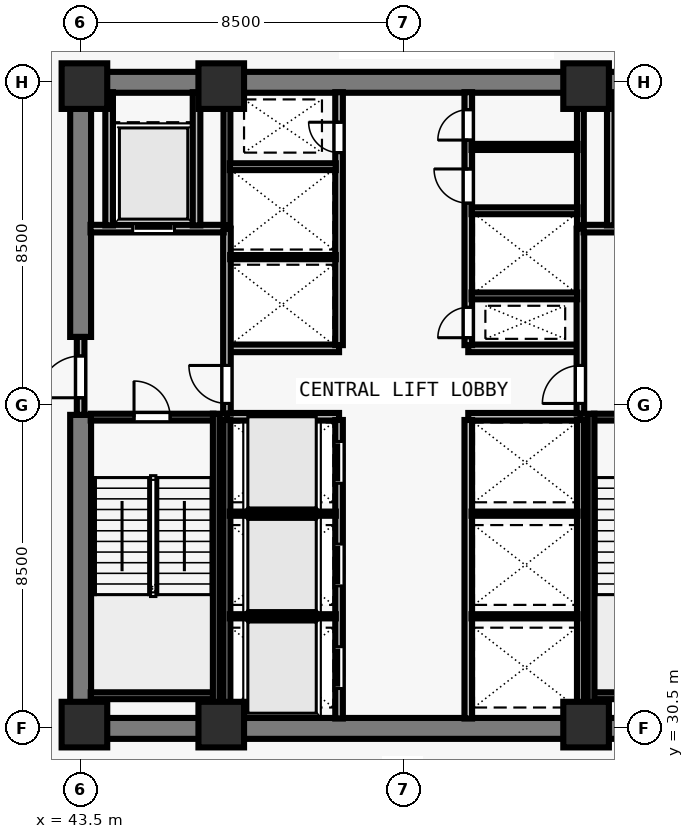
"""IFC4 building model, lengths in metres.
Left out: names, types, materials, properties, quantities, classifications, styles, units other than length and angle.
Written with IfcOpenShell. Run it as: python <this file> out.ifc"""

import sys

from ifc_helpers import new_model, si_unit, direction, frame, frame_2d, origin, origin_2d, place, context, subcontext, project, spatial, rectangle, extrude, element, fill, save


model = new_model("IFC4")
c1 = context("Model", 3, precision=1e-05, world=origin(), true_north=direction((0.0, 1.0)))
c2 = subcontext(c1, "Body", "Model", "MODEL_VIEW")
j1 = project(units=[si_unit("LENGTHUNIT", "METRE"), si_unit("PLANEANGLEUNIT", "RADIAN")], contexts=[c1])
p1 = place(None, origin())
s1 = spatial("IfcSite", under=j1, at=p1, CompositionType="ELEMENT")
p2 = place(p1, origin())
s2 = spatial("IfcBuilding", under=s1, at=p2, CompositionType="ELEMENT")
p3 = place(p2, frame((0.0, 0.0, 97.0)))
s3 = spatial("IfcBuildingStorey", under=s2, at=p3, CompositionType="ELEMENT", Elevation=97.0)
for number, where, z_axis, x_axis in (
    (1, (43.6, 30.6, 0.0), (0.0, 0.0, 1.0), (1.0, 0.0, 0.0)),
    (2, (47.2, 30.6, 0.0), (0.0, 0.0, 1.0), (1.0, 0.0, 0.0)),
    (3, (56.8, 30.6, 0.0), (0.0, 0.0, 1.0), (1.0, 0.0, 0.0)),
    (4, (43.6, 47.4, 0.0), (0.0, 0.0, 1.0), (1.0, 0.0, 0.0)),
    (5, (47.2, 47.4, 0.0), (0.0, 0.0, 1.0), (1.0, 0.0, 0.0)),
    (6, (56.8, 47.4, 0.0), (0.0, 0.0, 1.0), (1.0, 0.0, 0.0)),
):
    element("IfcColumn", number, at=place(p3, frame(where, z_axis=z_axis, x_axis=x_axis)), inside=s3, PredefinedType="COLUMN", context=c2, shape_type="SweptSolid", body=[
        extrude(rectangle(XDim=1.2, YDim=1.2, at=origin_2d()), origin(), (0.0, 0.0, 1.0), 4.5),
    ])
for number, where, z_axis, x_axis in (
    (7, (43.225, 30.5, 0.0), (0.0, 0.0, 1.0), (1.0, 0.0, 0.0)),
    (8, (43.225, 47.5, 0.0), (0.0, 0.0, 1.0), (1.0, 0.0, 0.0)),
):
    element("IfcWall", number, at=place(p3, frame(where, z_axis=z_axis, x_axis=x_axis)), inside=s3, PredefinedType="SHEAR", context=c2, shape_type="SweptSolid", body=[
        extrude(rectangle(XDim=17.55, YDim=0.55, at=frame_2d((8.775, 0.0))), origin(), (0.0, 0.0, 1.0), 4.28),
    ])
p4 = place(p3, frame((43.5, 30.765, 0.0), z_axis=(0.0, 0.0, 1.0), x_axis=(0.0, 1.0, 0.0)))
e9 = element("IfcWall", 9, at=p4, inside=s3, PredefinedType="SHEAR", context=c2, shape_type="SweptSolid", body=[
    extrude(rectangle(XDim=7.985, YDim=0.55, at=frame_2d((3.993, 0.0))), origin(), (0.0, 0.0, 1.0), 4.28),
])
p5 = place(p3, frame((43.5, 40.8, 0.0), z_axis=(0.0, 0.0, 1.0), x_axis=(0.0, 1.0, 0.0)))
e10 = element("IfcWall", 10, at=p5, inside=s3, PredefinedType="SHEAR", context=c2, shape_type="SweptSolid", body=[
    extrude(rectangle(XDim=6.435, YDim=0.55, at=frame_2d((3.218, 0.0))), origin(), (0.0, 0.0, 1.0), 4.28),
])
for number, where, z_axis, x_axis in (
    (11, (47.35, 38.7, 0.0), (0.0, 0.0, 1.0), (1.0, 0.0, 0.0)),
    (12, (47.35, 40.5, 0.0), (0.0, 0.0, 1.0), (1.0, 0.0, 0.0)),
    (13, (53.7, 38.7, 0.0), (0.0, 0.0, 1.0), (1.0, 0.0, 0.0)),
    (14, (53.7, 40.5, 0.0), (0.0, 0.0, 1.0), (1.0, 0.0, 0.0)),
):
    element("IfcWall", number, at=place(p3, frame(where, z_axis=z_axis, x_axis=x_axis)), inside=s3, PredefinedType="SOLIDWALL", context=c2, shape_type="SweptSolid", body=[
        extrude(rectangle(XDim=2.95, YDim=0.2, at=frame_2d((1.475, 0.0))), origin(), (0.0, 0.0, 1.0), 4.28),
    ])
p6 = place(p3, frame((50.3, 30.76, 0.0), z_axis=(0.0, 0.0, 1.0), x_axis=(0.0, 1.0, 0.0)))
e15 = element("IfcWall", 15, at=p6, inside=s3, PredefinedType="SOLIDWALL", context=c2, shape_type="SweptSolid", body=[
    extrude(rectangle(XDim=7.855, YDim=0.2, at=frame_2d((3.927, 0.0))), origin(), (0.0, 0.0, 1.0), 4.28),
])
p7 = place(p6, frame((0.79, 0.0, 0.0)))
e16 = element("IfcOpeningElement", 16, at=p7, cuts=e15, PredefinedType="OPENING", context=c2, shape_type="SweptSolid", body=[
    extrude(rectangle(XDim=1.1, YDim=2.2, at=frame_2d((0.55, 1.1))), frame((0.0, 0.11, 0.0), z_axis=(0.0, -1.0, 0.0), x_axis=(1.0, 0.0, 0.0)), (0.0, 0.0, 1.0), 0.22),
])
p8 = place(p6, frame((3.49, 0.0, 0.0)))
e17 = element("IfcOpeningElement", 17, at=p8, cuts=e15, PredefinedType="OPENING", context=c2, shape_type="SweptSolid", body=[
    extrude(rectangle(XDim=1.1, YDim=2.2, at=frame_2d((0.55, 1.1))), frame((0.0, 0.11, 0.0), z_axis=(0.0, -1.0, 0.0), x_axis=(1.0, 0.0, 0.0)), (0.0, 0.0, 1.0), 0.22),
])
p9 = place(p6, frame((6.19, 0.0, 0.0)))
e18 = element("IfcOpeningElement", 18, at=p9, cuts=e15, PredefinedType="OPENING", context=c2, shape_type="SweptSolid", body=[
    extrude(rectangle(XDim=1.1, YDim=2.2, at=frame_2d((0.55, 1.1))), frame((0.0, 0.11, 0.0), z_axis=(0.0, -1.0, 0.0), x_axis=(1.0, 0.0, 0.0)), (0.0, 0.0, 1.0), 0.22),
])
p10 = place(p3, frame((53.7, 30.76, 0.0), z_axis=(0.0, 0.0, 1.0), x_axis=(0.0, 1.0, 0.0)))
e19 = element("IfcWall", 19, at=p10, inside=s3, PredefinedType="SOLIDWALL", context=c2, shape_type="SweptSolid", body=[
    extrude(rectangle(XDim=7.855, YDim=0.2, at=frame_2d((3.927, 0.0))), origin(), (0.0, 0.0, 1.0), 4.28),
])
p11 = place(p3, frame((50.3, 40.585, 0.0), z_axis=(0.0, 0.0, 1.0), x_axis=(0.0, 1.0, 0.0)))
e20 = element("IfcWall", 20, at=p11, inside=s3, PredefinedType="SOLIDWALL", context=c2, shape_type="SweptSolid", body=[
    extrude(rectangle(XDim=6.655, YDim=0.2, at=frame_2d((3.328, 0.0))), origin(), (0.0, 0.0, 1.0), 4.28),
])
p12 = place(p11, frame((5.065, 0.0, 0.0)))
e21 = element("IfcOpeningElement", 21, at=p12, cuts=e20, PredefinedType="OPENING", context=c2, shape_type="SweptSolid", body=[
    extrude(rectangle(XDim=0.8, YDim=2.08, at=frame_2d((0.4, 1.04))), frame((0.0, 0.11, 0.0), z_axis=(0.0, -1.0, 0.0), x_axis=(1.0, 0.0, 0.0)), (0.0, 0.0, 1.0), 0.22),
])
p13 = place(p3, frame((53.7, 40.585, 0.0), z_axis=(0.0, 0.0, 1.0), x_axis=(0.0, 1.0, 0.0)))
e22 = element("IfcWall", 22, at=p13, inside=s3, PredefinedType="SOLIDWALL", context=c2, shape_type="SweptSolid", body=[
    extrude(rectangle(XDim=6.655, YDim=0.2, at=frame_2d((3.328, 0.0))), origin(), (0.0, 0.0, 1.0), 4.28),
])
p14 = place(p13, frame((0.195, 0.0, 0.0)))
e23 = element("IfcOpeningElement", 23, at=p14, cuts=e22, PredefinedType="OPENING", context=c2, shape_type="SweptSolid", body=[
    extrude(rectangle(XDim=0.8, YDim=2.08, at=frame_2d((0.4, 1.04))), frame((0.0, 0.11, 0.0), z_axis=(0.0, -1.0, 0.0), x_axis=(1.0, 0.0, 0.0)), (0.0, 0.0, 1.0), 0.22),
])
p15 = place(p13, frame((3.735, 0.0, 0.0)))
e24 = element("IfcOpeningElement", 24, at=p15, cuts=e22, PredefinedType="OPENING", context=c2, shape_type="SweptSolid", body=[
    extrude(rectangle(XDim=0.9, YDim=2.12, at=frame_2d((0.45, 1.06))), frame((0.0, 0.11, 0.0), z_axis=(0.0, -1.0, 0.0), x_axis=(1.0, 0.0, 0.0)), (0.0, 0.0, 1.0), 0.22),
])
p16 = place(p13, frame((5.395, 0.0, 0.0)))
e25 = element("IfcOpeningElement", 25, at=p16, cuts=e22, PredefinedType="OPENING", context=c2, shape_type="SweptSolid", body=[
    extrude(rectangle(XDim=0.8, YDim=2.1, at=frame_2d((0.4, 1.05))), frame((0.0, 0.11, 0.0), z_axis=(0.0, -1.0, 0.0), x_axis=(1.0, 0.0, 0.0)), (0.0, 0.0, 1.0), 0.22),
])
p17 = place(p3, frame((43.5, 38.75, 0.0), z_axis=(0.0, 0.0, 1.0), x_axis=(0.0, 1.0, 0.0)))
e26 = element("IfcWall", 26, at=p17, inside=s3, PredefinedType="SOLIDWALL", context=c2, shape_type="SweptSolid", body=[
    extrude(rectangle(XDim=2.05, YDim=0.2, at=frame_2d((1.025, 0.0))), origin(), (0.0, 0.0, 1.0), 4.28),
])
p18 = place(p17, frame((0.45, 0.0, 0.0)))
e27 = element("IfcOpeningElement", 27, at=p18, cuts=e26, PredefinedType="OPENING", context=c2, shape_type="SweptSolid", body=[
    extrude(rectangle(XDim=1.1, YDim=2.15, at=frame_2d((0.55, 1.075))), frame((0.0, 0.11, 0.0), z_axis=(0.0, -1.0, 0.0), x_axis=(1.0, 0.0, 0.0)), (0.0, 0.0, 1.0), 0.22),
])
p19 = place(p3, frame((47.35, 38.785, 0.0), z_axis=(0.0, 0.0, 1.0), x_axis=(0.0, 1.0, 0.0)))
e28 = element("IfcWall", 28, at=p19, inside=s3, PredefinedType="SOLIDWALL", context=c2, shape_type="SweptSolid", body=[
    extrude(rectangle(XDim=4.865, YDim=0.2, at=frame_2d((2.433, 0.0))), origin(), (0.0, 0.0, 1.0), 4.28),
])
p20 = place(p19, frame((0.265, 0.0, 0.0)))
e29 = element("IfcOpeningElement", 29, at=p20, cuts=e28, PredefinedType="OPENING", context=c2, shape_type="SweptSolid", body=[
    extrude(rectangle(XDim=1.0, YDim=2.15, at=frame_2d((0.5, 1.075))), frame((0.0, 0.11, 0.0), z_axis=(0.0, -1.0, 0.0), x_axis=(1.0, 0.0, 0.0)), (0.0, 0.0, 1.0), 0.22),
])
p21 = place(p3, frame((43.76, 43.65, 0.0), z_axis=(0.0, 0.0, 1.0), x_axis=(1.0, 0.0, 0.0)))
e30 = element("IfcWall", 30, at=p21, inside=s3, PredefinedType="SOLIDWALL", context=c2, shape_type="SweptSolid", body=[
    extrude(rectangle(XDim=3.505, YDim=0.2, at=frame_2d((1.752, 0.0))), origin(), (0.0, 0.0, 1.0), 4.28),
])
p22 = place(p21, frame((1.11, 0.0, 0.0)))
e31 = element("IfcOpeningElement", 31, at=p22, cuts=e30, PredefinedType="OPENING", context=c2, shape_type="SweptSolid", body=[
    extrude(rectangle(XDim=1.1, YDim=2.2, at=frame_2d((0.55, 1.1))), frame((0.0, 0.11, 0.0), z_axis=(0.0, -1.0, 0.0), x_axis=(1.0, 0.0, 0.0)), (0.0, 0.0, 1.0), 0.22),
])
for number, where, z_axis, x_axis in (
    (32, (46.55, 43.735, 0.0), (0.0, 0.0, 1.0), (0.0, 1.0, 0.0)),
    (33, (44.25, 43.735, 0.0), (0.0, 0.0, 1.0), (0.0, 1.0, 0.0)),
):
    element("IfcWall", number, at=place(p3, frame(where, z_axis=z_axis, x_axis=x_axis)), inside=s3, PredefinedType="SOLIDWALL", context=c2, shape_type="SweptSolid", body=[
        extrude(rectangle(XDim=3.505, YDim=0.2, at=frame_2d((1.752, 0.0))), origin(), (0.0, 0.0, 1.0), 4.28),
    ])
p23 = place(p3, frame((56.65, 38.785, 0.0), z_axis=(0.0, 0.0, 1.0), x_axis=(0.0, 1.0, 0.0)))
e34 = element("IfcWall", 34, at=p23, inside=s3, PredefinedType="SOLIDWALL", context=c2, shape_type="SweptSolid", body=[
    extrude(rectangle(XDim=4.865, YDim=0.2, at=frame_2d((2.433, 0.0))), origin(), (0.0, 0.0, 1.0), 4.28),
])
p24 = place(p23, frame((0.265, 0.0, 0.0)))
e35 = element("IfcOpeningElement", 35, at=p24, cuts=e34, PredefinedType="OPENING", context=c2, shape_type="SweptSolid", body=[
    extrude(rectangle(XDim=1.0, YDim=2.15, at=frame_2d((0.5, 1.075))), frame((0.0, 0.11, 0.0), z_axis=(0.0, -1.0, 0.0), x_axis=(1.0, 0.0, 0.0)), (0.0, 0.0, 1.0), 0.22),
])
p25 = place(p3, frame((56.735, 43.65, 0.0), z_axis=(0.0, 0.0, 1.0), x_axis=(1.0, 0.0, 0.0)))
e36 = element("IfcWall", 36, at=p25, inside=s3, PredefinedType="SOLIDWALL", context=c2, shape_type="SweptSolid", body=[
    extrude(rectangle(XDim=3.505, YDim=0.2, at=frame_2d((1.752, 0.0))), origin(), (0.0, 0.0, 1.0), 4.28),
])
p26 = place(p25, frame((1.295, 0.0, 0.0)))
e37 = element("IfcOpeningElement", 37, at=p26, cuts=e36, PredefinedType="OPENING", context=c2, shape_type="SweptSolid", body=[
    extrude(rectangle(XDim=1.1, YDim=2.2, at=frame_2d((0.55, 1.1))), frame((0.0, 0.11, 0.0), z_axis=(0.0, -1.0, 0.0), x_axis=(1.0, 0.0, 0.0)), (0.0, 0.0, 1.0), 0.22),
])
p27 = place(p3, frame((57.45, 43.735, 0.0), z_axis=(0.0, 0.0, 1.0), x_axis=(0.0, 1.0, 0.0)))
e38 = element("IfcWall", 38, at=p27, inside=s3, PredefinedType="SOLIDWALL", context=c2, shape_type="SweptSolid", body=[
    extrude(rectangle(XDim=3.505, YDim=0.2, at=frame_2d((1.752, 0.0))), origin(), (0.0, 0.0, 1.0), 4.28),
])
p28 = place(p3, frame((47.35, 30.76, 0.0), z_axis=(0.0, 0.0, 1.0), x_axis=(0.0, 1.0, 0.0)))
e39 = element("IfcWall", 39, at=p28, inside=s3, PredefinedType="SOLIDWALL", context=c2, shape_type="SweptSolid", body=[
    extrude(rectangle(XDim=7.855, YDim=0.18, at=frame_2d((3.927, 0.0))), origin(), (0.0, 0.0, 1.0), 4.28),
])
for number, where, z_axis, x_axis in (
    (40, (47.425, 33.45, 0.0), (0.0, 0.0, 1.0), (1.0, 0.0, 0.0)),
    (41, (47.425, 36.15, 0.0), (0.0, 0.0, 1.0), (1.0, 0.0, 0.0)),
):
    element("IfcWall", number, at=place(p3, frame(where, z_axis=z_axis, x_axis=x_axis)), inside=s3, PredefinedType="PARTITIONING", context=c2, shape_type="SweptSolid", body=[
        extrude(rectangle(XDim=2.79, YDim=0.11, at=frame_2d((1.395, 0.0))), origin(), (0.0, 0.0, 1.0), 4.28),
    ])
p29 = place(p3, frame((56.65, 30.76, 0.0), z_axis=(0.0, 0.0, 1.0), x_axis=(0.0, 1.0, 0.0)))
e42 = element("IfcWall", 42, at=p29, inside=s3, PredefinedType="SOLIDWALL", context=c2, shape_type="SweptSolid", body=[
    extrude(rectangle(XDim=7.855, YDim=0.18, at=frame_2d((3.927, 0.0))), origin(), (0.0, 0.0, 1.0), 4.28),
])
for number, where, z_axis, x_axis in (
    (43, (53.785, 33.45, 0.0), (0.0, 0.0, 1.0), (1.0, 0.0, 0.0)),
    (44, (53.785, 36.15, 0.0), (0.0, 0.0, 1.0), (1.0, 0.0, 0.0)),
):
    element("IfcWall", number, at=place(p3, frame(where, z_axis=z_axis, x_axis=x_axis)), inside=s3, PredefinedType="PARTITIONING", context=c2, shape_type="SweptSolid", body=[
        extrude(rectangle(XDim=2.79, YDim=0.11, at=frame_2d((1.395, 0.0))), origin(), (0.0, 0.0, 1.0), 4.28),
    ])
p30 = place(p3, frame((47.35, 43.735, 0.0), z_axis=(0.0, 0.0, 1.0), x_axis=(0.0, 1.0, 0.0)))
e45 = element("IfcWall", 45, at=p30, inside=s3, PredefinedType="SOLIDWALL", context=c2, shape_type="SweptSolid", body=[
    extrude(rectangle(XDim=3.505, YDim=0.18, at=frame_2d((1.752, 0.0))), origin(), (0.0, 0.0, 1.0), 4.28),
])
p31 = place(p3, frame((47.435, 42.9, 0.0), z_axis=(0.0, 0.0, 1.0), x_axis=(1.0, 0.0, 0.0)))
e46 = element("IfcWall", 46, at=p31, inside=s3, PredefinedType="PARTITIONING", context=c2, shape_type="SweptSolid", body=[
    extrude(rectangle(XDim=2.78, YDim=0.11, at=frame_2d((1.39, 0.0))), origin(), (0.0, 0.0, 1.0), 4.28),
])
p32 = place(p3, frame((47.425, 45.28, 0.0), z_axis=(0.0, 0.0, 1.0), x_axis=(1.0, 0.0, 0.0)))
e47 = element("IfcWall", 47, at=p32, inside=s3, PredefinedType="SOLIDWALL", context=c2, shape_type="SweptSolid", body=[
    extrude(rectangle(XDim=2.79, YDim=0.18, at=frame_2d((1.395, 0.0))), origin(), (0.0, 0.0, 1.0), 4.28),
])
p33 = place(p3, frame((56.65, 43.735, 0.0), z_axis=(0.0, 0.0, 1.0), x_axis=(0.0, 1.0, 0.0)))
e48 = element("IfcWall", 48, at=p33, inside=s3, PredefinedType="SOLIDWALL", context=c2, shape_type="SweptSolid", body=[
    extrude(rectangle(XDim=3.505, YDim=0.18, at=frame_2d((1.752, 0.0))), origin(), (0.0, 0.0, 1.0), 4.28),
])
p34 = place(p3, frame((53.785, 41.88, 0.0), z_axis=(0.0, 0.0, 1.0), x_axis=(1.0, 0.0, 0.0)))
e49 = element("IfcWall", 49, at=p34, inside=s3, PredefinedType="SOLIDWALL", context=c2, shape_type="SweptSolid", body=[
    extrude(rectangle(XDim=2.78, YDim=0.18, at=frame_2d((1.39, 0.0))), origin(), (0.0, 0.0, 1.0), 4.28),
])
p35 = place(p3, frame((53.785, 44.12, 0.0), z_axis=(0.0, 0.0, 1.0), x_axis=(1.0, 0.0, 0.0)))
e50 = element("IfcWall", 50, at=p35, inside=s3, PredefinedType="SOLIDWALL", context=c2, shape_type="SweptSolid", body=[
    extrude(rectangle(XDim=2.79, YDim=0.18, at=frame_2d((1.395, 0.0))), origin(), (0.0, 0.0, 1.0), 4.28),
])
p36 = place(p3, frame((53.785, 45.8, 0.0), z_axis=(0.0, 0.0, 1.0), x_axis=(1.0, 0.0, 0.0)))
e51 = element("IfcWall", 51, at=p36, inside=s3, PredefinedType="PARTITIONING", context=c2, shape_type="SweptSolid", body=[
    extrude(rectangle(XDim=2.79, YDim=0.16, at=frame_2d((1.395, 0.0))), origin(), (0.0, 0.0, 1.0), 4.28),
])
p37 = place(p3, frame((43.765, 38.69, 0.0), z_axis=(0.0, 0.0, 1.0), x_axis=(1.0, 0.0, 0.0)))
e52 = element("IfcWall", 52, at=p37, inside=s3, PredefinedType="SOLIDWALL", context=c2, shape_type="SweptSolid", body=[
    extrude(rectangle(XDim=3.23, YDim=0.18, at=frame_2d((1.615, 0.0))), origin(), (0.0, 0.0, 1.0), 4.28),
])
p38 = place(p37, frame((1.14, 0.0, 0.0)))
e53 = element("IfcOpeningElement", 53, at=p38, cuts=e52, PredefinedType="OPENING", context=c2, shape_type="SweptSolid", body=[
    extrude(rectangle(XDim=0.95, YDim=2.15, at=frame_2d((0.475, 1.075))), frame((0.0, 0.1, 0.0), z_axis=(0.0, -1.0, 0.0), x_axis=(1.0, 0.0, 0.0)), (0.0, 0.0, 1.0), 0.2),
])
p39 = place(p3, frame((43.765, 31.36, 0.0), z_axis=(0.0, 0.0, 1.0), x_axis=(1.0, 0.0, 0.0)))
e54 = element("IfcWall", 54, at=p39, inside=s3, PredefinedType="SOLIDWALL", context=c2, shape_type="SweptSolid", body=[
    extrude(rectangle(XDim=3.23, YDim=0.18, at=frame_2d((1.615, 0.0))), origin(), (0.0, 0.0, 1.0), 4.28),
])
p40 = place(p3, frame((47.07, 38.78, 0.0), z_axis=(0.0, 0.0, 1.0), x_axis=(0.0, -1.0, 0.0)))
e55 = element("IfcWall", 55, at=p40, inside=s3, PredefinedType="SOLIDWALL", context=c2, shape_type="SweptSolid", body=[
    extrude(rectangle(XDim=8.017, YDim=0.18, at=frame_2d((4.009, 0.0))), origin(), (0.0, 0.0, 1.0), 4.28),
])
p41 = place(p3, frame((57.005, 38.69, 0.0), z_axis=(0.0, 0.0, 1.0), x_axis=(1.0, 0.0, 0.0)))
e56 = element("IfcWall", 56, at=p41, inside=s3, PredefinedType="SOLIDWALL", context=c2, shape_type="SweptSolid", body=[
    extrude(rectangle(XDim=3.23, YDim=0.18, at=frame_2d((1.615, 0.0))), origin(), (0.0, 0.0, 1.0), 4.28),
])
p42 = place(p41, frame((1.14, 0.0, 0.0)))
e57 = element("IfcOpeningElement", 57, at=p42, cuts=e56, PredefinedType="OPENING", context=c2, shape_type="SweptSolid", body=[
    extrude(rectangle(XDim=0.95, YDim=2.15, at=frame_2d((0.475, 1.075))), frame((0.0, 0.1, 0.0), z_axis=(0.0, -1.0, 0.0), x_axis=(1.0, 0.0, 0.0)), (0.0, 0.0, 1.0), 0.2),
])
p43 = place(p3, frame((57.005, 31.36, 0.0), z_axis=(0.0, 0.0, 1.0), x_axis=(1.0, 0.0, 0.0)))
e58 = element("IfcWall", 58, at=p43, inside=s3, PredefinedType="SOLIDWALL", context=c2, shape_type="SweptSolid", body=[
    extrude(rectangle(XDim=3.23, YDim=0.18, at=frame_2d((1.615, 0.0))), origin(), (0.0, 0.0, 1.0), 4.28),
])
p44 = place(p3, frame((56.93, 38.78, 0.0), z_axis=(0.0, 0.0, 1.0), x_axis=(0.0, -1.0, 0.0)))
e59 = element("IfcWall", 59, at=p44, inside=s3, PredefinedType="SOLIDWALL", context=c2, shape_type="SweptSolid", body=[
    extrude(rectangle(XDim=8.017, YDim=0.18, at=frame_2d((4.009, 0.0))), origin(), (0.0, 0.0, 1.0), 4.28),
])
p45 = place(p18, origin())
e60 = element("IfcDoor", 60, at=p45, inside=s3, OperationType="SINGLE_SWING_LEFT", PredefinedType="DOOR", context=c2, shape_type="SweptSolid", body=[
    extrude(rectangle(XDim=1.1, YDim=2.15, at=frame_2d((0.55, 1.075))), frame((0.0, 0.025, 0.0), z_axis=(0.0, -1.0, 0.0), x_axis=(1.0, 0.0, 0.0)), (0.0, 0.0, 1.0), 0.05),
])
fill(e27, e60)
p46 = place(p20, origin())
e61 = element("IfcDoor", 61, at=p46, inside=s3, OperationType="SINGLE_SWING_RIGHT", PredefinedType="DOOR", context=c2, shape_type="SweptSolid", body=[
    extrude(rectangle(XDim=1.0, YDim=2.15, at=frame_2d((0.5, 1.075))), frame((0.0, 0.025, 0.0), z_axis=(0.0, -1.0, 0.0), x_axis=(1.0, 0.0, 0.0)), (0.0, 0.0, 1.0), 0.05),
])
fill(e29, e61)
p47 = place(p22, origin())
e62 = element("IfcDoor", 62, at=p47, inside=s3, OperationType="SLIDING_TO_LEFT", PredefinedType="DOOR", context=c2, shape_type="SweptSolid", body=[
    extrude(rectangle(XDim=1.1, YDim=2.2, at=frame_2d((0.55, 1.1))), frame((0.0, 0.025, 0.0), z_axis=(0.0, -1.0, 0.0), x_axis=(1.0, 0.0, 0.0)), (0.0, 0.0, 1.0), 0.05),
])
fill(e31, e62)
p48 = place(p24, origin())
e63 = element("IfcDoor", 63, at=p48, inside=s3, OperationType="SINGLE_SWING_LEFT", PredefinedType="DOOR", context=c2, shape_type="SweptSolid", body=[
    extrude(rectangle(XDim=1.0, YDim=2.15, at=frame_2d((0.5, 1.075))), frame((0.0, 0.025, 0.0), z_axis=(0.0, -1.0, 0.0), x_axis=(1.0, 0.0, 0.0)), (0.0, 0.0, 1.0), 0.05),
])
fill(e35, e63)
p49 = place(p7, origin())
e64 = element("IfcDoor", 64, at=p49, inside=s3, OperationType="SLIDING_TO_LEFT", PredefinedType="DOOR", context=c2, shape_type="SweptSolid", body=[
    extrude(rectangle(XDim=1.1, YDim=2.2, at=frame_2d((0.55, 1.1))), frame((0.0, 0.025, 0.0), z_axis=(0.0, -1.0, 0.0), x_axis=(1.0, 0.0, 0.0)), (0.0, 0.0, 1.0), 0.05),
])
fill(e16, e64)
p50 = place(p8, origin())
e65 = element("IfcDoor", 65, at=p50, inside=s3, OperationType="SLIDING_TO_LEFT", PredefinedType="DOOR", context=c2, shape_type="SweptSolid", body=[
    extrude(rectangle(XDim=1.1, YDim=2.2, at=frame_2d((0.55, 1.1))), frame((0.0, 0.025, 0.0), z_axis=(0.0, -1.0, 0.0), x_axis=(1.0, 0.0, 0.0)), (0.0, 0.0, 1.0), 0.05),
])
fill(e17, e65)
p51 = place(p9, origin())
e66 = element("IfcDoor", 66, at=p51, inside=s3, OperationType="SLIDING_TO_LEFT", PredefinedType="DOOR", context=c2, shape_type="SweptSolid", body=[
    extrude(rectangle(XDim=1.1, YDim=2.2, at=frame_2d((0.55, 1.1))), frame((0.0, 0.025, 0.0), z_axis=(0.0, -1.0, 0.0), x_axis=(1.0, 0.0, 0.0)), (0.0, 0.0, 1.0), 0.05),
])
fill(e18, e66)
p52 = place(p12, origin())
e67 = element("IfcDoor", 67, at=p52, inside=s3, OperationType="SINGLE_SWING_RIGHT", PredefinedType="DOOR", context=c2, shape_type="SweptSolid", body=[
    extrude(rectangle(XDim=0.8, YDim=2.08, at=frame_2d((0.4, 1.04))), frame((0.0, 0.025, 0.0), z_axis=(0.0, -1.0, 0.0), x_axis=(1.0, 0.0, 0.0)), (0.0, 0.0, 1.0), 0.05),
])
fill(e21, e67)
p53 = place(p14, origin())
e68 = element("IfcDoor", 68, at=p53, inside=s3, OperationType="SINGLE_SWING_LEFT", PredefinedType="DOOR", context=c2, shape_type="SweptSolid", body=[
    extrude(rectangle(XDim=0.8, YDim=2.08, at=frame_2d((0.4, 1.04))), frame((0.0, 0.025, 0.0), z_axis=(0.0, -1.0, 0.0), x_axis=(1.0, 0.0, 0.0)), (0.0, 0.0, 1.0), 0.05),
])
fill(e23, e68)
p54 = place(p15, origin())
e69 = element("IfcDoor", 69, at=p54, inside=s3, OperationType="SINGLE_SWING_RIGHT", PredefinedType="DOOR", context=c2, shape_type="SweptSolid", body=[
    extrude(rectangle(XDim=0.9, YDim=2.12, at=frame_2d((0.45, 1.06))), frame((0.0, 0.025, 0.0), z_axis=(0.0, -1.0, 0.0), x_axis=(1.0, 0.0, 0.0)), (0.0, 0.0, 1.0), 0.05),
])
fill(e24, e69)
p55 = place(p16, origin())
e70 = element("IfcDoor", 70, at=p55, inside=s3, OperationType="SINGLE_SWING_LEFT", PredefinedType="DOOR", context=c2, shape_type="SweptSolid", body=[
    extrude(rectangle(XDim=0.8, YDim=2.1, at=frame_2d((0.4, 1.05))), frame((0.0, 0.025, 0.0), z_axis=(0.0, -1.0, 0.0), x_axis=(1.0, 0.0, 0.0)), (0.0, 0.0, 1.0), 0.05),
])
fill(e25, e70)
p56 = place(p38, origin())
e71 = element("IfcDoor", 71, at=p56, inside=s3, OperationType="SINGLE_SWING_LEFT", PredefinedType="DOOR", context=c2, shape_type="SweptSolid", body=[
    extrude(rectangle(XDim=0.95, YDim=2.15, at=frame_2d((0.475, 1.075))), frame((0.0, 0.025, 0.0), z_axis=(0.0, -1.0, 0.0), x_axis=(1.0, 0.0, 0.0)), (0.0, 0.0, 1.0), 0.05),
])
fill(e53, e71)
save(model, sys.argv[1])
